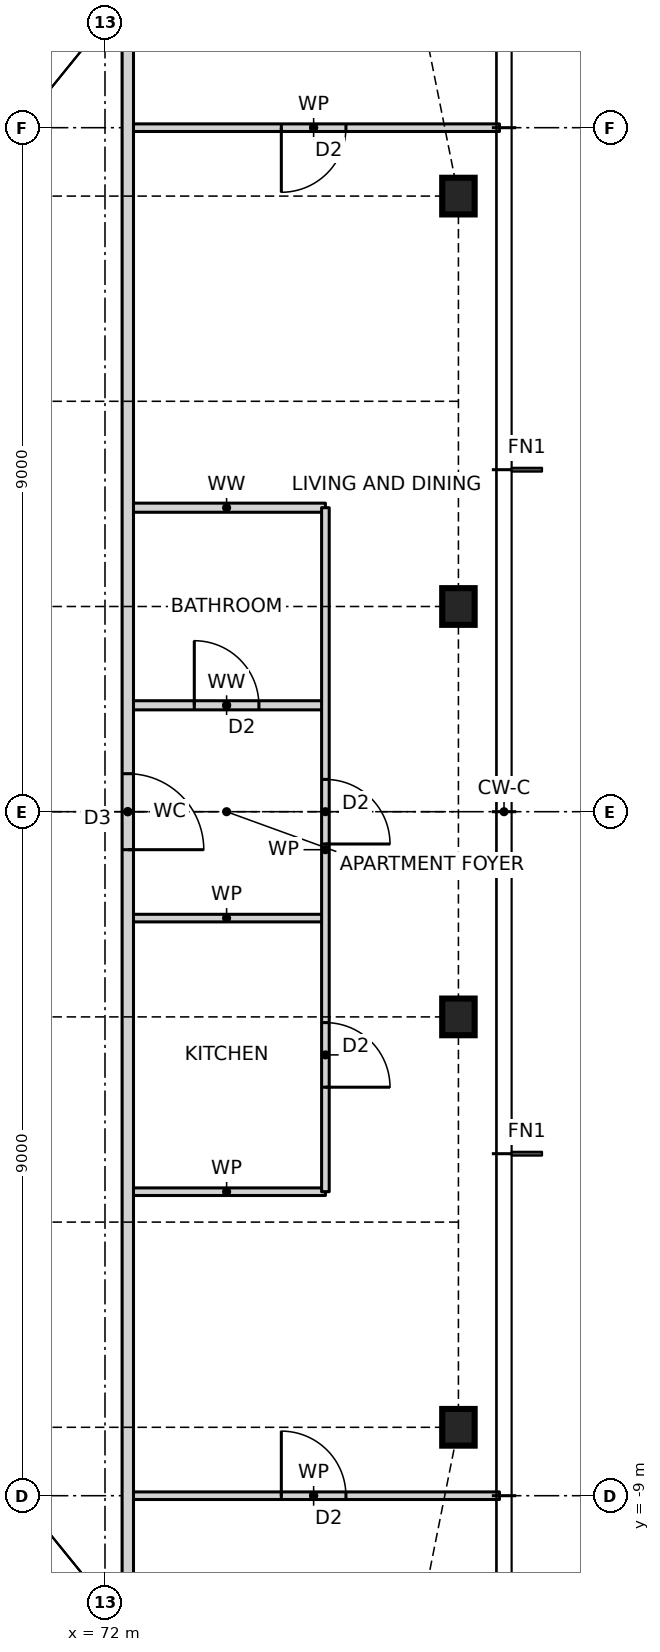
"""IFC4 building model, lengths in metres.
Left out: names, types, materials, properties, quantities, classifications, styles, units other than length and angle.
Written with IfcOpenShell. Run it as: python <this file> out.ifc"""

import sys

from ifc_helpers import new_model, si_unit, direction, frame, frame_2d, origin, origin_2d, place, context, subcontext, project, spatial, rectangle, i_section, extrude, element, fill, save


model = new_model("IFC4")
c1 = context("Model", 3, precision=1e-05, world=origin(), true_north=direction((0.0, 1.0)))
c2 = subcontext(c1, "Body", "Model", "MODEL_VIEW")
j1 = project(units=[si_unit("LENGTHUNIT", "METRE"), si_unit("PLANEANGLEUNIT", "RADIAN")], contexts=[c1])
p1 = place(None, origin())
s1 = spatial("IfcSite", under=j1, at=p1, CompositionType="ELEMENT")
p2 = place(p1, origin())
s2 = spatial("IfcBuilding", under=s1, at=p2, CompositionType="ELEMENT")
p3 = place(p2, frame((0.0, 0.0, 115.5)))
s3 = spatial("IfcBuildingStorey", under=s2, at=p3, CompositionType="ELEMENT", Elevation=115.5)
for number, where, z_axis, x_axis in (
    (1, (76.65, -8.1, 0.0), (0.0, 0.0, 1.0), (1.0, 0.0, 0.0)),
    (2, (76.65, -2.7, 0.0), (0.0, 0.0, 1.0), (1.0, 0.0, 0.0)),
    (3, (76.65, 2.7, 0.0), (0.0, 0.0, 1.0), (1.0, 0.0, 0.0)),
    (4, (76.65, 8.1, 0.0), (0.0, 0.0, 1.0), (1.0, 0.0, 0.0)),
):
    element("IfcColumn", number, at=place(p3, frame(where, z_axis=z_axis, x_axis=x_axis)), inside=s3, PredefinedType="COLUMN", context=c2, shape_type="SweptSolid", body=[
        extrude(i_section(OverallWidth=0.427, OverallDepth=0.483, WebThickness=0.051, FlangeThickness=0.082, at=origin_2d()), origin(), (0.0, 0.0, 1.0), 3.5),
    ])
p4 = place(p3, frame((72.3, -9.0, 0.0), z_axis=(0.0, 0.0, 1.0), x_axis=(1.0, 0.0, 0.0)))
e5 = element("IfcWall", 5, at=p4, inside=s3, PredefinedType="PARTITIONING", context=c2, shape_type="SweptSolid", body=[
    extrude(rectangle(XDim=4.89, YDim=0.1, at=frame_2d((2.445, 0.0))), origin(), (0.0, 0.0, 1.0), 3.27),
])
p5 = place(p4, frame((2.02, 0.0, 0.0)))
e6 = element("IfcOpeningElement", 6, at=p5, cuts=e5, PredefinedType="OPENING", context=c2, shape_type="SweptSolid", body=[
    extrude(rectangle(XDim=0.85, YDim=2.1, at=frame_2d((0.425, 1.05))), frame((0.0, 0.06, 0.0), z_axis=(0.0, -1.0, 0.0), x_axis=(1.0, 0.0, 0.0)), (0.0, 0.0, 1.0), 0.12),
])
for number, where, z_axis, x_axis in (
    (7, (72.3, -5.0, 0.0), (0.0, 0.0, 1.0), (1.0, 0.0, 0.0)),
    (8, (72.3, -1.4, 0.0), (0.0, 0.0, 1.0), (1.0, 0.0, 0.0)),
):
    element("IfcWall", number, at=place(p3, frame(where, z_axis=z_axis, x_axis=x_axis)), inside=s3, PredefinedType="PARTITIONING", context=c2, shape_type="SweptSolid", body=[
        extrude(rectangle(XDim=2.6, YDim=0.1, at=frame_2d((1.3, 0.0))), origin(), (0.0, 0.0, 1.0), 3.27),
    ])
p6 = place(p3, frame((72.3, 1.4, 0.0), z_axis=(0.0, 0.0, 1.0), x_axis=(1.0, 0.0, 0.0)))
e9 = element("IfcWall", 9, at=p6, inside=s3, PredefinedType="PARTITIONING", context=c2, shape_type="SweptSolid", body=[
    extrude(rectangle(XDim=2.6, YDim=0.12, at=frame_2d((1.3, 0.0))), origin(), (0.0, 0.0, 1.0), 3.27),
])
p7 = place(p6, frame((0.875, 0.0, 0.0)))
e10 = element("IfcOpeningElement", 10, at=p7, cuts=e9, PredefinedType="OPENING", context=c2, shape_type="SweptSolid", body=[
    extrude(rectangle(XDim=0.85, YDim=2.1, at=frame_2d((0.425, 1.05))), frame((0.0, 0.07, 0.0), z_axis=(0.0, -1.0, 0.0), x_axis=(1.0, 0.0, 0.0)), (0.0, 0.0, 1.0), 0.14),
])
p8 = place(p3, frame((72.3, 4.0, 0.0), z_axis=(0.0, 0.0, 1.0), x_axis=(1.0, 0.0, 0.0)))
e11 = element("IfcWall", 11, at=p8, inside=s3, PredefinedType="PARTITIONING", context=c2, shape_type="SweptSolid", body=[
    extrude(rectangle(XDim=2.6, YDim=0.12, at=frame_2d((1.3, 0.0))), origin(), (0.0, 0.0, 1.0), 3.27),
])
p9 = place(p3, frame((72.3, 9.0, 0.0), z_axis=(0.0, 0.0, 1.0), x_axis=(1.0, 0.0, 0.0)))
e12 = element("IfcWall", 12, at=p9, inside=s3, PredefinedType="PARTITIONING", context=c2, shape_type="SweptSolid", body=[
    extrude(rectangle(XDim=4.89, YDim=0.1, at=frame_2d((2.445, 0.0))), origin(), (0.0, 0.0, 1.0), 3.27),
])
p10 = place(p9, frame((2.02, 0.0, 0.0)))
e13 = element("IfcOpeningElement", 13, at=p10, cuts=e12, PredefinedType="OPENING", context=c2, shape_type="SweptSolid", body=[
    extrude(rectangle(XDim=0.85, YDim=2.1, at=frame_2d((0.425, 1.05))), frame((0.0, 0.06, 0.0), z_axis=(0.0, -1.0, 0.0), x_axis=(1.0, 0.0, 0.0)), (0.0, 0.0, 1.0), 0.12),
])
p11 = place(p3, frame((74.9, -5.0, 0.0), z_axis=(0.0, 0.0, 1.0), x_axis=(0.0, 1.0, 0.0)))
e14 = element("IfcWall", 14, at=p11, inside=s3, PredefinedType="PARTITIONING", context=c2, shape_type="SweptSolid", body=[
    extrude(rectangle(XDim=9.0, YDim=0.1, at=frame_2d((4.5, 0.0))), origin(), (0.0, 0.0, 1.0), 3.27),
])
p12 = place(p11, frame((1.375, 0.0, 0.0)))
e15 = element("IfcOpeningElement", 15, at=p12, cuts=e14, PredefinedType="OPENING", context=c2, shape_type="SweptSolid", body=[
    extrude(rectangle(XDim=0.85, YDim=2.1, at=frame_2d((0.425, 1.05))), frame((0.0, 0.06, 0.0), z_axis=(0.0, -1.0, 0.0), x_axis=(1.0, 0.0, 0.0)), (0.0, 0.0, 1.0), 0.12),
])
p13 = place(p11, frame((4.575, 0.0, 0.0)))
e16 = element("IfcOpeningElement", 16, at=p13, cuts=e14, PredefinedType="OPENING", context=c2, shape_type="SweptSolid", body=[
    extrude(rectangle(XDim=0.85, YDim=2.1, at=frame_2d((0.425, 1.05))), frame((0.0, 0.06, 0.0), z_axis=(0.0, -1.0, 0.0), x_axis=(1.0, 0.0, 0.0)), (0.0, 0.0, 1.0), 0.12),
])
p14 = place(p3, frame((72.3, -10.768, 0.0), z_axis=(0.0, 0.0, 1.0), x_axis=(0.0, 1.0, 0.0)))
e17 = element("IfcWall", 17, at=p14, inside=s3, PredefinedType="PARTITIONING", context=c2, shape_type="SweptSolid", body=[
    extrude(rectangle(XDim=21.536, YDim=0.15, at=frame_2d((10.768, 0.0))), origin(), (0.0, 0.0, 1.0), 3.27),
])
p15 = place(p14, frame((10.268, 0.0, 0.0)))
e18 = element("IfcOpeningElement", 18, at=p15, cuts=e17, PredefinedType="OPENING", context=c2, shape_type="SweptSolid", body=[
    extrude(rectangle(XDim=1.0, YDim=2.1, at=frame_2d((0.5, 1.05))), frame((0.0, 0.085, 0.0), z_axis=(0.0, -1.0, 0.0), x_axis=(1.0, 0.0, 0.0)), (0.0, 0.0, 1.0), 0.17),
])
p16 = place(p12, frame((0.85, 0.0, 0.0), z_axis=(0.0, 0.0, 1.0), x_axis=(-1.0, 0.0, 0.0)))
e19 = element("IfcDoor", 19, at=p16, inside=s3, OperationType="SINGLE_SWING_RIGHT", PredefinedType="DOOR", context=c2, shape_type="SweptSolid", body=[
    extrude(rectangle(XDim=0.85, YDim=2.1, at=frame_2d((0.425, 1.05))), frame((0.0, 0.025, 0.0), z_axis=(0.0, -1.0, 0.0), x_axis=(1.0, 0.0, 0.0)), (0.0, 0.0, 1.0), 0.05),
])
fill(e15, e19)
p17 = place(p15, frame((1.0, 0.0, 0.0), z_axis=(0.0, 0.0, 1.0), x_axis=(-1.0, 0.0, 0.0)))
e20 = element("IfcDoor", 20, at=p17, inside=s3, OperationType="SINGLE_SWING_RIGHT", PredefinedType="DOOR", context=c2, shape_type="SweptSolid", body=[
    extrude(rectangle(XDim=1.0, YDim=2.1, at=frame_2d((0.5, 1.05))), frame((0.0, 0.025, 0.0), z_axis=(0.0, -1.0, 0.0), x_axis=(1.0, 0.0, 0.0)), (0.0, 0.0, 1.0), 0.05),
])
fill(e18, e20)
p18 = place(p13, frame((0.85, 0.0, 0.0), z_axis=(0.0, 0.0, 1.0), x_axis=(-1.0, 0.0, 0.0)))
e21 = element("IfcDoor", 21, at=p18, inside=s3, OperationType="SINGLE_SWING_RIGHT", PredefinedType="DOOR", context=c2, shape_type="SweptSolid", body=[
    extrude(rectangle(XDim=0.85, YDim=2.1, at=frame_2d((0.425, 1.05))), frame((0.0, 0.025, 0.0), z_axis=(0.0, -1.0, 0.0), x_axis=(1.0, 0.0, 0.0)), (0.0, 0.0, 1.0), 0.05),
])
fill(e16, e21)
p19 = place(p7, origin())
e22 = element("IfcDoor", 22, at=p19, inside=s3, OperationType="SINGLE_SWING_LEFT", PredefinedType="DOOR", context=c2, shape_type="SweptSolid", body=[
    extrude(rectangle(XDim=0.85, YDim=2.1, at=frame_2d((0.425, 1.05))), frame((0.0, 0.025, 0.0), z_axis=(0.0, -1.0, 0.0), x_axis=(1.0, 0.0, 0.0)), (0.0, 0.0, 1.0), 0.05),
])
fill(e10, e22)
p20 = place(p5, origin())
e23 = element("IfcDoor", 23, at=p20, inside=s3, OperationType="SINGLE_SWING_LEFT", PredefinedType="DOOR", context=c2, shape_type="SweptSolid", body=[
    extrude(rectangle(XDim=0.85, YDim=2.1, at=frame_2d((0.425, 1.05))), frame((0.0, 0.025, 0.0), z_axis=(0.0, -1.0, 0.0), x_axis=(1.0, 0.0, 0.0)), (0.0, 0.0, 1.0), 0.05),
])
fill(e6, e23)
p21 = place(p10, frame((0.85, 0.0, 0.0), z_axis=(0.0, 0.0, 1.0), x_axis=(-1.0, 0.0, 0.0)))
e24 = element("IfcDoor", 24, at=p21, inside=s3, OperationType="SINGLE_SWING_RIGHT", PredefinedType="DOOR", context=c2, shape_type="SweptSolid", body=[
    extrude(rectangle(XDim=0.85, YDim=2.1, at=frame_2d((0.425, 1.05))), frame((0.0, 0.025, 0.0), z_axis=(0.0, -1.0, 0.0), x_axis=(1.0, 0.0, 0.0)), (0.0, 0.0, 1.0), 0.05),
])
fill(e13, e24)
save(model, sys.argv[1])
